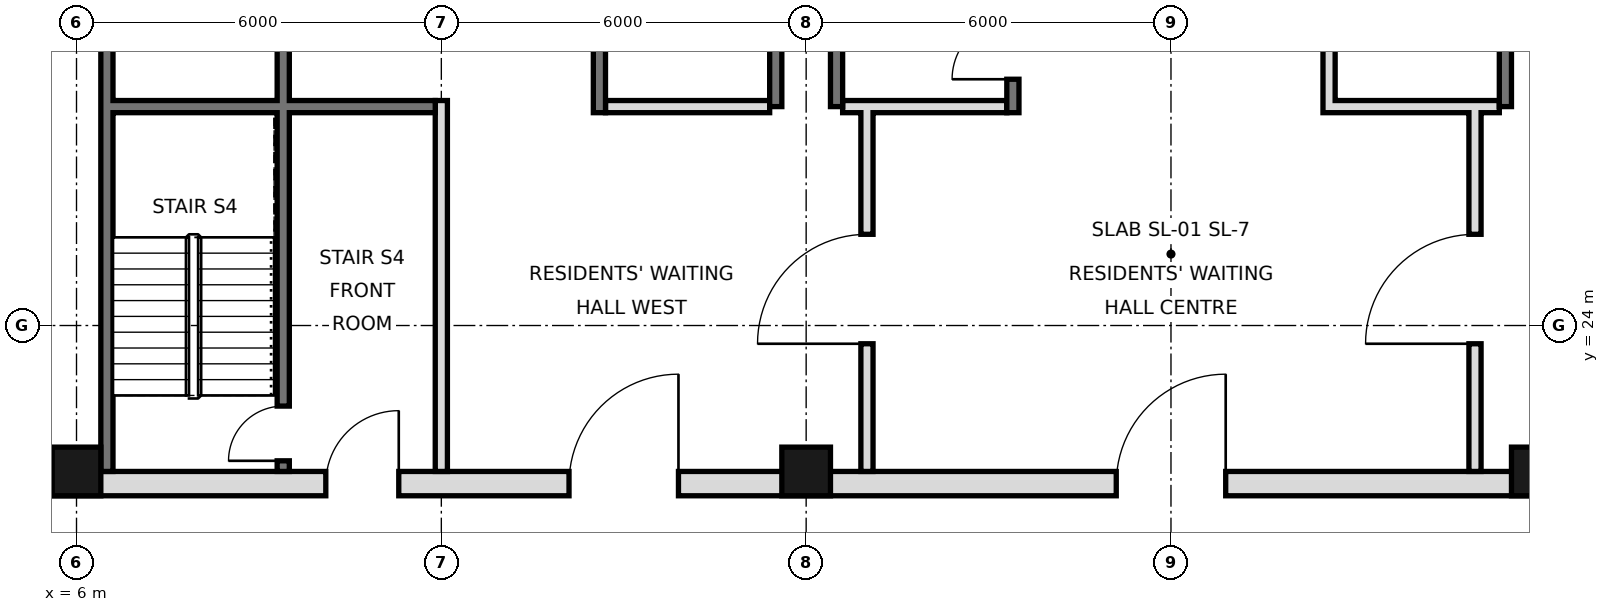
"""IFC4 building model, lengths in metres.
Left out: names, types, materials, properties, quantities, classifications, styles, units other than length and angle.
Written with IfcOpenShell. Run it as: python <this file> out.ifc"""

import sys

from ifc_helpers import new_model, si_unit, direction, frame, frame_2d, origin, origin_2d, place, context, subcontext, project, spatial, rectangle, hollow_rectangle, extrude, element, fill, save


model = new_model("IFC4")
c1 = context("Model", 3, precision=1e-05, world=origin(), true_north=direction((0.0, 1.0)))
c2 = subcontext(c1, "Body", "Model", "MODEL_VIEW")
j1 = project(units=[si_unit("LENGTHUNIT", "METRE"), si_unit("PLANEANGLEUNIT", "RADIAN")], contexts=[c1])
p1 = place(None, origin())
s1 = spatial("IfcSite", under=j1, at=p1, CompositionType="ELEMENT")
p2 = place(p1, origin())
s2 = spatial("IfcBuilding", under=s1, at=p2, CompositionType="ELEMENT")
p3 = place(p2, frame((0.0, 0.0, 308.8)))
s3 = spatial("IfcBuildingStorey", under=s2, at=p3, CompositionType="ELEMENT", Elevation=308.8)
for number, where, z_axis, x_axis in (
    (1, (6.0, 21.6, 0.0), (0.0, 0.0, 1.0), (1.0, 0.0, 0.0)),
    (2, (18.0, 21.6, 0.0), (0.0, 0.0, 1.0), (1.0, 0.0, 0.0)),
    (3, (30.0, 21.6, 0.0), (0.0, 0.0, 1.0), (1.0, 0.0, 0.0)),
):
    element("IfcColumn", number, at=place(p3, frame(where, z_axis=z_axis, x_axis=x_axis)), inside=s3, PredefinedType="COLUMN", context=c2, shape_type="SweptSolid", body=[
        extrude(hollow_rectangle(XDim=0.8, YDim=0.8, WallThickness=0.025, at=origin_2d()), origin(), (0.0, 0.0, 1.0), 3.6),
    ])
p4 = place(p3, frame((6.5, 21.6, 0.0), z_axis=(0.0, 0.0, 1.0), x_axis=(0.0, 1.0, 0.0)))
e4 = element("IfcWall", 4, at=p4, inside=s3, PredefinedType="SOLIDWALL", context=c2, shape_type="SweptSolid", body=[
    extrude(rectangle(XDim=23.5, YDim=0.2, at=frame_2d((11.75, 0.0))), origin(), (0.0, 0.0, 1.0), 3.42),
])
for number, where, z_axis, x_axis in (
    (5, (17.5, 27.6, 0.0), (0.0, 0.0, 1.0), (0.0, 1.0, 0.0)),
    (6, (18.5, 27.6, 0.0), (0.0, 0.0, 1.0), (0.0, 1.0, 0.0)),
    (7, (29.5, 27.6, 0.0), (0.0, 0.0, 1.0), (0.0, 1.0, 0.0)),
):
    element("IfcWall", number, at=place(p3, frame(where, z_axis=z_axis, x_axis=x_axis)), inside=s3, PredefinedType="SOLIDWALL", context=c2, shape_type="SweptSolid", body=[
        extrude(rectangle(XDim=17.5, YDim=0.2, at=frame_2d((8.75, 0.0))), origin(), (0.0, 0.0, 1.0), 3.42),
    ])
p5 = place(p3, frame((5.6, 21.4, 0.0), z_axis=(0.0, 0.0, 1.0), x_axis=(1.0, 0.0, 0.0)))
e8 = element("IfcWall", 8, at=p5, inside=s3, PredefinedType="SOLIDWALL", context=c2, shape_type="SweptSolid", body=[
    extrude(rectangle(XDim=36.8, YDim=0.4, at=frame_2d((18.4, 0.0))), origin(), (0.0, 0.0, 1.0), 3.42),
])
p6 = place(p5, frame((8.5, 0.0, 0.0)))
e9 = element("IfcOpeningElement", 9, at=p6, cuts=e8, PredefinedType="OPENING", context=c2, shape_type="SweptSolid", body=[
    extrude(rectangle(XDim=1.8, YDim=2.1, at=frame_2d((0.9, 1.05))), frame((0.0, 0.21, 0.0), z_axis=(0.0, -1.0, 0.0), x_axis=(1.0, 0.0, 0.0)), (0.0, 0.0, 1.0), 0.42),
])
p7 = place(p5, frame((17.5, 0.0, 0.0)))
e10 = element("IfcOpeningElement", 10, at=p7, cuts=e8, PredefinedType="OPENING", context=c2, shape_type="SweptSolid", body=[
    extrude(rectangle(XDim=1.8, YDim=2.1, at=frame_2d((0.9, 1.05))), frame((0.0, 0.21, 0.0), z_axis=(0.0, -1.0, 0.0), x_axis=(1.0, 0.0, 0.0)), (0.0, 0.0, 1.0), 0.42),
])
p8 = place(p5, frame((26.5, 0.0, 0.0)))
e11 = element("IfcOpeningElement", 11, at=p8, cuts=e8, PredefinedType="OPENING", context=c2, shape_type="SweptSolid", body=[
    extrude(rectangle(XDim=1.8, YDim=2.1, at=frame_2d((0.9, 1.05))), frame((0.0, 0.21, 0.0), z_axis=(0.0, -1.0, 0.0), x_axis=(1.0, 0.0, 0.0)), (0.0, 0.0, 1.0), 0.42),
])
p9 = place(p5, frame((4.5, 0.0, 0.0)))
e12 = element("IfcOpeningElement", 12, at=p9, cuts=e8, PredefinedType="OPENING", context=c2, shape_type="SweptSolid", body=[
    extrude(rectangle(XDim=1.2, YDim=2.1, at=frame_2d((0.6, 1.05))), frame((0.0, 0.21, 0.0), z_axis=(0.0, -1.0, 0.0), x_axis=(1.0, 0.0, 0.0)), (0.0, 0.0, 1.0), 0.42),
])
p10 = place(p5, frame((31.1, 0.0, 0.0)))
e13 = element("IfcOpeningElement", 13, at=p10, cuts=e8, PredefinedType="OPENING", context=c2, shape_type="SweptSolid", body=[
    extrude(rectangle(XDim=1.2, YDim=2.1, at=frame_2d((0.6, 1.05))), frame((0.0, 0.21, 0.0), z_axis=(0.0, -1.0, 0.0), x_axis=(1.0, 0.0, 0.0)), (0.0, 0.0, 1.0), 0.42),
])
p11 = place(p3, frame((19.0, 21.6, 0.0), z_axis=(0.0, 0.0, 1.0), x_axis=(0.0, 1.0, 0.0)))
e14 = element("IfcWall", 14, at=p11, inside=s3, PredefinedType="PARTITIONING", context=c2, shape_type="SweptSolid", body=[
    extrude(rectangle(XDim=6.0, YDim=0.2, at=frame_2d((3.0, 0.0))), origin(), (0.0, 0.0, 1.0), 3.42),
])
p12 = place(p11, frame((2.1, 0.0, 0.0)))
e15 = element("IfcOpeningElement", 15, at=p12, cuts=e14, PredefinedType="OPENING", context=c2, shape_type="SweptSolid", body=[
    extrude(rectangle(XDim=1.8, YDim=2.1, at=frame_2d((0.9, 1.05))), frame((0.0, 0.11, 0.0), z_axis=(0.0, -1.0, 0.0), x_axis=(1.0, 0.0, 0.0)), (0.0, 0.0, 1.0), 0.22),
])
p13 = place(p3, frame((29.0, 21.6, 0.0), z_axis=(0.0, 0.0, 1.0), x_axis=(0.0, 1.0, 0.0)))
e16 = element("IfcWall", 16, at=p13, inside=s3, PredefinedType="PARTITIONING", context=c2, shape_type="SweptSolid", body=[
    extrude(rectangle(XDim=6.0, YDim=0.2, at=frame_2d((3.0, 0.0))), origin(), (0.0, 0.0, 1.0), 3.42),
])
p14 = place(p13, frame((2.1, 0.0, 0.0)))
e17 = element("IfcOpeningElement", 17, at=p14, cuts=e16, PredefinedType="OPENING", context=c2, shape_type="SweptSolid", body=[
    extrude(rectangle(XDim=1.8, YDim=2.1, at=frame_2d((0.9, 1.05))), frame((0.0, 0.11, 0.0), z_axis=(0.0, -1.0, 0.0), x_axis=(1.0, 0.0, 0.0)), (0.0, 0.0, 1.0), 0.22),
])
p15 = place(p3, frame((12.0, 21.6, 0.0), z_axis=(0.0, 0.0, 1.0), x_axis=(0.0, 1.0, 0.0)))
e18 = element("IfcWall", 18, at=p15, inside=s3, PredefinedType="PARTITIONING", context=c2, shape_type="SweptSolid", body=[
    extrude(rectangle(XDim=6.1, YDim=0.2, at=frame_2d((3.05, 0.0))), origin(), (0.0, 0.0, 1.0), 3.42),
])
p16 = place(p3, frame((14.6, 27.5, 0.0), z_axis=(0.0, 0.0, 1.0), x_axis=(0.0, 1.0, 0.0)))
e19 = element("IfcWall", 19, at=p16, inside=s3, PredefinedType="SOLIDWALL", context=c2, shape_type="SweptSolid", body=[
    extrude(rectangle(XDim=17.5, YDim=0.2, at=frame_2d((8.75, 0.0))), origin(), (0.0, 0.0, 1.0), 3.42),
])
p17 = place(p16, frame((15.4, 0.0, 0.0)))
e20 = element("IfcOpeningElement", 20, at=p17, cuts=e19, PredefinedType="OPENING", context=c2, shape_type="SweptSolid", body=[
    extrude(rectangle(XDim=1.1, YDim=2.1, at=frame_2d((0.55, 1.05))), frame((0.0, 0.11, 0.0), z_axis=(0.0, -1.0, 0.0), x_axis=(1.0, 0.0, 0.0)), (0.0, 0.0, 1.0), 0.22),
])
p18 = place(p16, frame((2.7, 0.0, 0.0)))
e21 = element("IfcOpeningElement", 21, at=p18, cuts=e19, PredefinedType="OPENING", context=c2, shape_type="SweptSolid", body=[
    extrude(rectangle(XDim=1.0, YDim=2.1, at=frame_2d((0.5, 1.05))), frame((0.0, 0.11, 0.0), z_axis=(0.0, -1.0, 0.0), x_axis=(1.0, 0.0, 0.0)), (0.0, 0.0, 1.0), 0.22),
])
p19 = place(p16, frame((9.9, 0.0, 0.0)))
e22 = element("IfcOpeningElement", 22, at=p19, cuts=e19, PredefinedType="OPENING", context=c2, shape_type="SweptSolid", body=[
    extrude(rectangle(XDim=0.9, YDim=2.1, at=frame_2d((0.45, 1.05))), frame((0.0, 0.11, 0.0), z_axis=(0.0, -1.0, 0.0), x_axis=(1.0, 0.0, 0.0)), (0.0, 0.0, 1.0), 0.22),
])
p20 = place(p3, frame((21.4, 27.5, 0.0), z_axis=(0.0, 0.0, 1.0), x_axis=(0.0, 1.0, 0.0)))
e23 = element("IfcWall", 23, at=p20, inside=s3, PredefinedType="SOLIDWALL", context=c2, shape_type="SweptSolid", body=[
    extrude(rectangle(XDim=17.5, YDim=0.2, at=frame_2d((8.75, 0.0))), origin(), (0.0, 0.0, 1.0), 3.42),
])
p21 = place(p20, frame((0.55, 0.0, 0.0)))
e24 = element("IfcOpeningElement", 24, at=p21, cuts=e23, PredefinedType="OPENING", context=c2, shape_type="SweptSolid", body=[
    extrude(rectangle(XDim=1.0, YDim=2.1, at=frame_2d((0.5, 1.05))), frame((0.0, 0.11, 0.0), z_axis=(0.0, -1.0, 0.0), x_axis=(1.0, 0.0, 0.0)), (0.0, 0.0, 1.0), 0.22),
])
p22 = place(p20, frame((3.65, 0.0, 0.0)))
e25 = element("IfcOpeningElement", 25, at=p22, cuts=e23, PredefinedType="OPENING", context=c2, shape_type="SweptSolid", body=[
    extrude(rectangle(XDim=1.0, YDim=2.1, at=frame_2d((0.5, 1.05))), frame((0.0, 0.11, 0.0), z_axis=(0.0, -1.0, 0.0), x_axis=(1.0, 0.0, 0.0)), (0.0, 0.0, 1.0), 0.22),
])
p23 = place(p20, frame((16.2, 0.0, 0.0)))
e26 = element("IfcOpeningElement", 26, at=p23, cuts=e23, PredefinedType="OPENING", context=c2, shape_type="SweptSolid", body=[
    extrude(rectangle(XDim=1.0, YDim=2.1, at=frame_2d((0.5, 1.05))), frame((0.0, 0.11, 0.0), z_axis=(0.0, -1.0, 0.0), x_axis=(1.0, 0.0, 0.0)), (0.0, 0.0, 1.0), 0.22),
])
p24 = place(p20, frame((7.4, 0.0, 0.0)))
e27 = element("IfcOpeningElement", 27, at=p24, cuts=e23, PredefinedType="OPENING", context=c2, shape_type="SweptSolid", body=[
    extrude(rectangle(XDim=0.9, YDim=2.1, at=frame_2d((0.45, 1.05))), frame((0.0, 0.11, 0.0), z_axis=(0.0, -1.0, 0.0), x_axis=(1.0, 0.0, 0.0)), (0.0, 0.0, 1.0), 0.22),
])
p25 = place(p3, frame((26.6, 27.5, 0.0), z_axis=(0.0, 0.0, 1.0), x_axis=(0.0, 1.0, 0.0)))
e28 = element("IfcWall", 28, at=p25, inside=s3, PredefinedType="SOLIDWALL", context=c2, shape_type="SweptSolid", body=[
    extrude(rectangle(XDim=17.5, YDim=0.2, at=frame_2d((8.75, 0.0))), origin(), (0.0, 0.0, 1.0), 3.42),
])
p26 = place(p25, frame((4.3, 0.0, 0.0)))
e29 = element("IfcOpeningElement", 29, at=p26, cuts=e28, PredefinedType="OPENING", context=c2, shape_type="SweptSolid", body=[
    extrude(rectangle(XDim=0.9, YDim=2.1, at=frame_2d((0.45, 1.05))), frame((0.0, 0.11, 0.0), z_axis=(0.0, -1.0, 0.0), x_axis=(1.0, 0.0, 0.0)), (0.0, 0.0, 1.0), 0.22),
])
p27 = place(p25, frame((10.35, 0.0, 0.0)))
e30 = element("IfcOpeningElement", 30, at=p27, cuts=e28, PredefinedType="OPENING", context=c2, shape_type="SweptSolid", body=[
    extrude(rectangle(XDim=1.0, YDim=2.1, at=frame_2d((0.5, 1.05))), frame((0.0, 0.11, 0.0), z_axis=(0.0, -1.0, 0.0), x_axis=(1.0, 0.0, 0.0)), (0.0, 0.0, 1.0), 0.22),
])
p28 = place(p25, frame((15.475, 0.0, 0.0)))
e31 = element("IfcOpeningElement", 31, at=p28, cuts=e28, PredefinedType="OPENING", context=c2, shape_type="SweptSolid", body=[
    extrude(rectangle(XDim=1.0, YDim=2.1, at=frame_2d((0.5, 1.05))), frame((0.0, 0.11, 0.0), z_axis=(0.0, -1.0, 0.0), x_axis=(1.0, 0.0, 0.0)), (0.0, 0.0, 1.0), 0.22),
])
p29 = place(p3, frame((9.4, 21.6, 0.0), z_axis=(0.0, 0.0, 1.0), x_axis=(0.0, 1.0, 0.0)))
e32 = element("IfcWall", 32, at=p29, inside=s3, PredefinedType="SOLIDWALL", context=c2, shape_type="SweptSolid", body=[
    extrude(rectangle(XDim=23.4, YDim=0.2, at=frame_2d((11.7, 0.0))), origin(), (0.0, 0.0, 1.0), 3.42),
])
p30 = place(p29, frame((7.8, 0.0, 0.0)))
e33 = element("IfcOpeningElement", 33, at=p30, cuts=e32, PredefinedType="OPENING", context=c2, shape_type="SweptSolid", body=[
    extrude(rectangle(XDim=1.0, YDim=2.1, at=frame_2d((0.5, 1.05))), frame((0.0, 0.11, 0.0), z_axis=(0.0, -1.0, 0.0), x_axis=(1.0, 0.0, 0.0)), (0.0, 0.0, 1.0), 0.22),
])
p31 = place(p29, frame((12.45, 0.0, 0.0)))
e34 = element("IfcOpeningElement", 34, at=p31, cuts=e32, PredefinedType="OPENING", context=c2, shape_type="SweptSolid", body=[
    extrude(rectangle(XDim=1.0, YDim=2.1, at=frame_2d((0.5, 1.05))), frame((0.0, 0.11, 0.0), z_axis=(0.0, -1.0, 0.0), x_axis=(1.0, 0.0, 0.0)), (0.0, 0.0, 1.0), 0.22),
])
p32 = place(p29, frame((22.1, 0.0, 0.0)))
e35 = element("IfcOpeningElement", 35, at=p32, cuts=e32, PredefinedType="OPENING", context=c2, shape_type="SweptSolid", body=[
    extrude(rectangle(XDim=1.0, YDim=2.1, at=frame_2d((0.5, 1.05))), frame((0.0, 0.11, 0.0), z_axis=(0.0, -1.0, 0.0), x_axis=(1.0, 0.0, 0.0)), (0.0, 0.0, 1.0), 0.22),
])
p33 = place(p29, frame((0.175, 0.0, 0.0)))
e36 = element("IfcOpeningElement", 36, at=p33, cuts=e32, PredefinedType="OPENING", context=c2, shape_type="SweptSolid", body=[
    extrude(rectangle(XDim=0.9, YDim=2.1, at=frame_2d((0.45, 1.05))), frame((0.0, 0.11, 0.0), z_axis=(0.0, -1.0, 0.0), x_axis=(1.0, 0.0, 0.0)), (0.0, 0.0, 1.0), 0.22),
])
for number, where, z_axis, x_axis in (
    (37, (14.7, 27.6, 0.0), (0.0, 0.0, 1.0), (1.0, 0.0, 0.0)),
    (38, (18.6, 27.6, 0.0), (0.0, 0.0, 1.0), (1.0, 0.0, 0.0)),
):
    element("IfcWall", number, at=place(p3, frame(where, z_axis=z_axis, x_axis=x_axis)), inside=s3, PredefinedType="PARTITIONING", context=c2, shape_type="SweptSolid", body=[
        extrude(rectangle(XDim=2.7, YDim=0.2, at=frame_2d((1.35, 0.0))), origin(), (0.0, 0.0, 1.0), 3.42),
    ])
p34 = place(p3, frame((26.7, 27.6, 0.0), z_axis=(0.0, 0.0, 1.0), x_axis=(1.0, 0.0, 0.0)))
e39 = element("IfcWall", 39, at=p34, inside=s3, PredefinedType="SOLIDWALL", context=c2, shape_type="SweptSolid", body=[
    extrude(rectangle(XDim=2.7, YDim=0.2, at=frame_2d((1.35, 0.0))), origin(), (0.0, 0.0, 1.0), 3.42),
])
p35 = place(p3, frame((6.6, 27.6, 0.0), z_axis=(0.0, 0.0, 1.0), x_axis=(1.0, 0.0, 0.0)))
e40 = element("IfcWall", 40, at=p35, inside=s3, PredefinedType="SOLIDWALL", context=c2, shape_type="SweptSolid", body=[
    extrude(rectangle(XDim=5.3, YDim=0.2, at=frame_2d((2.65, 0.0))), origin(), (0.0, 0.0, 1.0), 3.42),
])
p36 = place(p6, frame((1.8, 0.0, 0.0), z_axis=(0.0, 0.0, 1.0), x_axis=(-1.0, 0.0, 0.0)))
e41 = element("IfcDoor", 41, at=p36, inside=s3, OperationType="SINGLE_SWING_LEFT", PredefinedType="DOOR", context=c2, shape_type="SweptSolid", body=[
    extrude(rectangle(XDim=1.8, YDim=2.1, at=frame_2d((0.9, 1.05))), frame((0.0, 0.025, 0.0), z_axis=(0.0, -1.0, 0.0), x_axis=(1.0, 0.0, 0.0)), (0.0, 0.0, 1.0), 0.05),
])
fill(e9, e41)
p37 = place(p12, origin())
e42 = element("IfcDoor", 42, at=p37, inside=s3, OperationType="SINGLE_SWING_LEFT", PredefinedType="DOOR", context=c2, shape_type="SweptSolid", body=[
    extrude(rectangle(XDim=1.8, YDim=2.1, at=frame_2d((0.9, 1.05))), frame((0.0, 0.025, 0.0), z_axis=(0.0, -1.0, 0.0), x_axis=(1.0, 0.0, 0.0)), (0.0, 0.0, 1.0), 0.05),
])
fill(e15, e42)
p38 = place(p7, frame((1.8, 0.0, 0.0), z_axis=(0.0, 0.0, 1.0), x_axis=(-1.0, 0.0, 0.0)))
e43 = element("IfcDoor", 43, at=p38, inside=s3, OperationType="SINGLE_SWING_LEFT", PredefinedType="DOOR", context=c2, shape_type="SweptSolid", body=[
    extrude(rectangle(XDim=1.8, YDim=2.1, at=frame_2d((0.9, 1.05))), frame((0.0, 0.025, 0.0), z_axis=(0.0, -1.0, 0.0), x_axis=(1.0, 0.0, 0.0)), (0.0, 0.0, 1.0), 0.05),
])
fill(e10, e43)
p39 = place(p14, origin())
e44 = element("IfcDoor", 44, at=p39, inside=s3, OperationType="SINGLE_SWING_LEFT", PredefinedType="DOOR", context=c2, shape_type="SweptSolid", body=[
    extrude(rectangle(XDim=1.8, YDim=2.1, at=frame_2d((0.9, 1.05))), frame((0.0, 0.025, 0.0), z_axis=(0.0, -1.0, 0.0), x_axis=(1.0, 0.0, 0.0)), (0.0, 0.0, 1.0), 0.05),
])
fill(e17, e44)
p40 = place(p9, frame((1.2, 0.0, 0.0), z_axis=(0.0, 0.0, 1.0), x_axis=(-1.0, 0.0, 0.0)))
e45 = element("IfcDoor", 45, at=p40, inside=s3, OperationType="SINGLE_SWING_LEFT", PredefinedType="DOOR", context=c2, shape_type="SweptSolid", body=[
    extrude(rectangle(XDim=1.2, YDim=2.1, at=frame_2d((0.6, 1.05))), frame((0.0, 0.025, 0.0), z_axis=(0.0, -1.0, 0.0), x_axis=(1.0, 0.0, 0.0)), (0.0, 0.0, 1.0), 0.05),
])
fill(e12, e45)
p41 = place(p21, origin())
e46 = element("IfcDoor", 46, at=p41, inside=s3, OperationType="SINGLE_SWING_LEFT", PredefinedType="DOOR", context=c2, shape_type="SweptSolid", body=[
    extrude(rectangle(XDim=1.0, YDim=2.1, at=frame_2d((0.5, 1.05))), frame((0.0, 0.025, 0.0), z_axis=(0.0, -1.0, 0.0), x_axis=(1.0, 0.0, 0.0)), (0.0, 0.0, 1.0), 0.05),
])
fill(e24, e46)
p42 = place(p33, origin())
e47 = element("IfcDoor", 47, at=p42, inside=s3, OperationType="SINGLE_SWING_LEFT", PredefinedType="DOOR", context=c2, shape_type="SweptSolid", body=[
    extrude(rectangle(XDim=0.9, YDim=2.1, at=frame_2d((0.45, 1.05))), frame((0.0, 0.025, 0.0), z_axis=(0.0, -1.0, 0.0), x_axis=(1.0, 0.0, 0.0)), (0.0, 0.0, 1.0), 0.05),
])
fill(e36, e47)
save(model, sys.argv[1])
